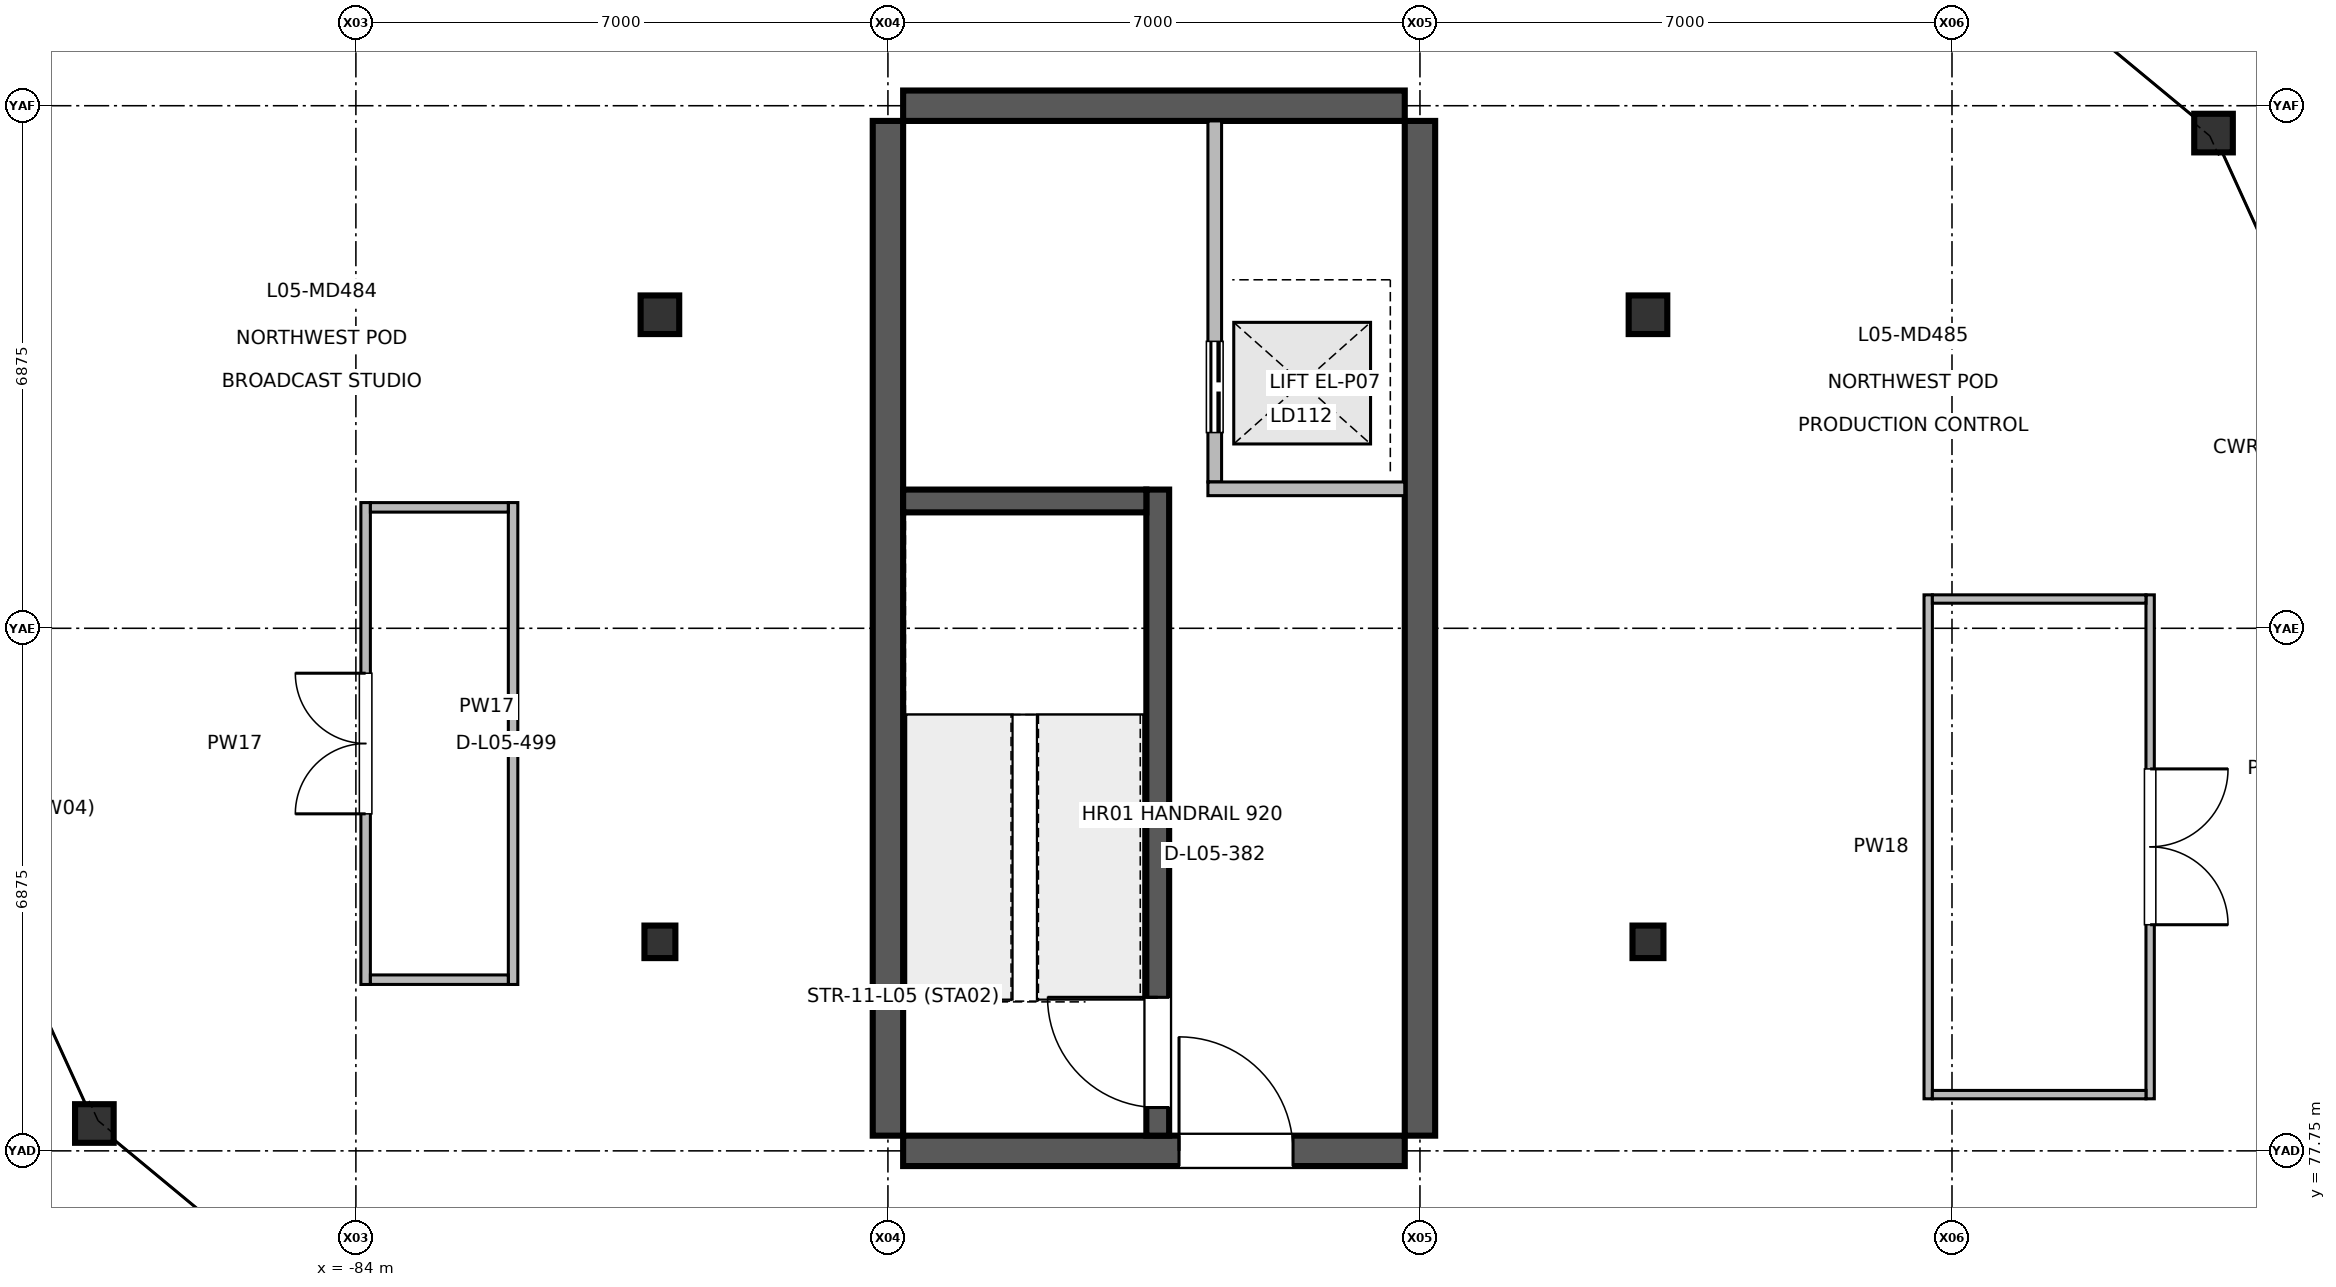
"""IFC4 building model, lengths in metres.
Left out: names, types, materials, properties, quantities, classifications, styles, units other than length and angle.
Written with IfcOpenShell. Run it as: python <this file> out.ifc"""

import sys

from ifc_helpers import new_model, si_unit, direction, frame, frame_2d, origin, origin_2d, place, context, subcontext, project, spatial, rectangle, hollow_circle, i_section, extrude, element, fill, save


model = new_model("IFC4")
c1 = context("Model", 3, precision=1e-05, world=origin(), true_north=direction((0.0, 1.0)))
c2 = subcontext(c1, "Body", "Model", "MODEL_VIEW")
j1 = project(units=[si_unit("LENGTHUNIT", "METRE"), si_unit("PLANEANGLEUNIT", "RADIAN")], contexts=[c1])
p1 = place(None, origin())
s1 = spatial("IfcSite", under=j1, at=p1, CompositionType="ELEMENT")
p2 = place(p1, origin())
s2 = spatial("IfcBuilding", under=s1, at=p2, CompositionType="ELEMENT")
p3 = place(p2, frame((0.0, 0.0, 21.0)))
s3 = spatial("IfcBuildingStorey", under=s2, at=p3, CompositionType="ELEMENT", Elevation=21.0)
for number, where, z_axis, x_axis in (
    (1, (-80.0, 80.5, 0.0), (0.0, 0.0, 1.0), (1.0, 0.0, 0.0)),
    (2, (-67.0, 80.5, 0.0), (0.0, 0.0, 1.0), (1.0, 0.0, 0.0)),
):
    element("IfcColumn", number, at=place(p3, frame(where, z_axis=z_axis, x_axis=x_axis)), inside=s3, PredefinedType="COLUMN", context=c2, shape_type="SweptSolid", body=[
        extrude(i_section(OverallWidth=0.407, OverallDepth=0.428, WebThickness=0.02, FlangeThickness=0.035, at=origin_2d()), origin(), (0.0, 0.0, 1.0), 5.398),
    ])
for number, where, z_axis, x_axis in (
    (3, (-80.0, 88.75, 0.0), (0.0, 0.0, 1.0), (1.0, 0.0, 0.0)),
    (4, (-67.0, 88.75, 0.0), (0.0, 0.0, 1.0), (1.0, 0.0, 0.0)),
    (5, (-59.559, 91.14, 0.0), (0.0, 0.0, 1.0), (1.0, 0.0, 0.0)),
    (6, (-87.441, 78.11, 0.0), (0.0, 0.0, 1.0), (1.0, 0.0, 0.0)),
):
    element("IfcColumn", number, at=place(p3, frame(where, z_axis=z_axis, x_axis=x_axis)), inside=s3, PredefinedType="COLUMN", context=c2, shape_type="SweptSolid", body=[
        extrude(hollow_circle(Radius=0.254, WallThickness=0.025, at=origin_2d()), origin(), (0.0, 0.0, 1.0), 5.398),
    ])
for number, where, z_axis, x_axis in (
    (7, (-77.0, 77.95, 0.0), (0.0, 0.0, 1.0), (0.0, 1.0, 0.0)),
    (8, (-70.0, 77.95, 0.0), (0.0, 0.0, 1.0), (0.0, 1.0, 0.0)),
):
    element("IfcWall", number, at=place(p3, frame(where, z_axis=z_axis, x_axis=x_axis)), inside=s3, PredefinedType="SHEAR", context=c2, shape_type="SweptSolid", body=[
        extrude(rectangle(XDim=13.35, YDim=0.4, at=frame_2d((6.675, 0.0))), origin(), (0.0, 0.0, 1.0), 5.15),
    ])
p4 = place(p3, frame((-76.8, 77.75, 0.0), z_axis=(0.0, 0.0, 1.0), x_axis=(1.0, 0.0, 0.0)))
e9 = element("IfcWall", 9, at=p4, inside=s3, PredefinedType="SHEAR", context=c2, shape_type="SweptSolid", body=[
    extrude(rectangle(XDim=6.6, YDim=0.4, at=frame_2d((3.3, 0.0))), origin(), (0.0, 0.0, 1.0), 5.15),
])
p5 = place(p4, frame((3.63, 0.0, 0.0)))
e10 = element("IfcOpeningElement", 10, at=p5, cuts=e9, PredefinedType="OPENING", context=c2, shape_type="SweptSolid", body=[
    extrude(rectangle(XDim=1.5, YDim=2.2, at=frame_2d((0.75, 1.1))), frame((0.0, 0.21, 0.0), z_axis=(0.0, -1.0, 0.0), x_axis=(1.0, 0.0, 0.0)), (0.0, 0.0, 1.0), 0.42),
])
p6 = place(p3, frame((-76.8, 91.5, 0.0), z_axis=(0.0, 0.0, 1.0), x_axis=(1.0, 0.0, 0.0)))
e11 = element("IfcWall", 11, at=p6, inside=s3, PredefinedType="SHEAR", context=c2, shape_type="SweptSolid", body=[
    extrude(rectangle(XDim=6.6, YDim=0.4, at=frame_2d((3.3, 0.0))), origin(), (0.0, 0.0, 1.0), 5.15),
])
p7 = place(p3, frame((-73.45, 77.95, 0.0), z_axis=(0.0, 0.0, 1.0), x_axis=(0.0, 1.0, 0.0)))
e12 = element("IfcWall", 12, at=p7, inside=s3, PredefinedType="SHEAR", context=c2, shape_type="SweptSolid", body=[
    extrude(rectangle(XDim=8.5, YDim=0.3, at=frame_2d((4.25, 0.0))), origin(), (0.0, 0.0, 1.0), 5.15),
])
p8 = place(p7, frame((0.37, 0.0, 0.0)))
e13 = element("IfcOpeningElement", 13, at=p8, cuts=e12, PredefinedType="OPENING", context=c2, shape_type="SweptSolid", body=[
    extrude(rectangle(XDim=1.45, YDim=2.2, at=frame_2d((0.725, 1.1))), frame((0.0, 0.16, 0.0), z_axis=(0.0, -1.0, 0.0), x_axis=(1.0, 0.0, 0.0)), (0.0, 0.0, 1.0), 0.32),
])
p9 = place(p3, frame((-72.7, 86.55, 0.0), z_axis=(0.0, 0.0, 1.0), x_axis=(0.0, 1.0, 0.0)))
e14 = element("IfcWall", 14, at=p9, inside=s3, PredefinedType="PARTITIONING", context=c2, shape_type="SweptSolid", body=[
    extrude(rectangle(XDim=4.75, YDim=0.18, at=frame_2d((2.375, 0.0))), origin(), (0.0, 0.0, 1.0), 4.42),
])
p10 = place(p9, frame((0.65, 0.0, 0.0)))
e15 = element("IfcOpeningElement", 15, at=p10, cuts=e14, PredefinedType="OPENING", context=c2, shape_type="SweptSolid", body=[
    extrude(rectangle(XDim=1.2, YDim=2.25, at=frame_2d((0.6, 1.125))), frame((0.0, 0.1, 0.0), z_axis=(0.0, -1.0, 0.0), x_axis=(1.0, 0.0, 0.0)), (0.0, 0.0, 1.0), 0.2),
])
p11 = place(p3, frame((-83.872, 79.939, 0.0), z_axis=(0.0, 0.0, 1.0), x_axis=(0.0, 1.0, 0.0)))
e16 = element("IfcWall", 16, at=p11, inside=s3, PredefinedType="PARTITIONING", context=c2, shape_type="SweptSolid", body=[
    extrude(rectangle(XDim=6.34, YDim=0.125, at=frame_2d((3.17, 0.0))), origin(), (0.0, 0.0, 1.0), 4.42),
])
p12 = place(p11, frame((2.245, 0.0, 0.0)))
e17 = element("IfcOpeningElement", 17, at=p12, cuts=e16, PredefinedType="OPENING", context=c2, shape_type="SweptSolid", body=[
    extrude(rectangle(XDim=1.85, YDim=2.4, at=frame_2d((0.925, 1.2))), frame((0.0, 0.073, 0.0), z_axis=(0.0, -1.0, 0.0), x_axis=(1.0, 0.0, 0.0)), (0.0, 0.0, 1.0), 0.145),
])
p13 = place(p3, frame((-60.393, 85.065, 0.0), z_axis=(0.0, 0.0, 1.0), x_axis=(0.0, -1.0, 0.0)))
e18 = element("IfcWall", 18, at=p13, inside=s3, PredefinedType="PARTITIONING", context=c2, shape_type="SweptSolid", body=[
    extrude(rectangle(XDim=6.63, YDim=0.11, at=frame_2d((3.315, 0.0))), origin(), (0.0, 0.0, 1.0), 4.42),
])
p14 = place(p13, frame((2.29, 0.0, 0.0)))
e19 = element("IfcOpeningElement", 19, at=p14, cuts=e18, PredefinedType="OPENING", context=c2, shape_type="SweptSolid", body=[
    extrude(rectangle(XDim=2.05, YDim=2.4, at=frame_2d((1.025, 1.2))), frame((0.0, 0.065, 0.0), z_axis=(0.0, -1.0, 0.0), x_axis=(1.0, 0.0, 0.0)), (0.0, 0.0, 1.0), 0.13),
])
p15 = place(p3, frame((-72.79, 86.46, 0.0), z_axis=(0.0, 0.0, 1.0), x_axis=(1.0, 0.0, 0.0)))
e20 = element("IfcWall", 20, at=p15, inside=s3, PredefinedType="PARTITIONING", context=c2, shape_type="SweptSolid", body=[
    extrude(rectangle(XDim=2.59, YDim=0.18, at=frame_2d((1.295, 0.0))), origin(), (0.0, 0.0, 1.0), 4.42),
])
p16 = place(p3, frame((-81.932, 79.939, 0.0), z_axis=(0.0, 0.0, 1.0), x_axis=(0.0, 1.0, 0.0)))
e21 = element("IfcWall", 21, at=p16, inside=s3, PredefinedType="PARTITIONING", context=c2, shape_type="SweptSolid", body=[
    extrude(rectangle(XDim=6.34, YDim=0.125, at=frame_2d((3.17, 0.0))), origin(), (0.0, 0.0, 1.0), 4.42),
])
for number, where, z_axis, x_axis in (
    (22, (-83.809, 80.002, 0.0), (0.0, 0.0, 1.0), (1.0, 0.0, 0.0)),
    (23, (-83.809, 86.216, 0.0), (0.0, 0.0, 1.0), (1.0, 0.0, 0.0)),
):
    element("IfcWall", number, at=place(p3, frame(where, z_axis=z_axis, x_axis=x_axis)), inside=s3, PredefinedType="PARTITIONING", context=c2, shape_type="SweptSolid", body=[
        extrude(rectangle(XDim=1.814, YDim=0.125, at=frame_2d((0.907, 0.0))), origin(), (0.0, 0.0, 1.0), 4.42),
    ])
p17 = place(p3, frame((-63.313, 78.435, 0.0), z_axis=(0.0, 0.0, 1.0), x_axis=(0.0, 1.0, 0.0)))
e24 = element("IfcWall", 24, at=p17, inside=s3, PredefinedType="PARTITIONING", context=c2, shape_type="SweptSolid", body=[
    extrude(rectangle(XDim=6.63, YDim=0.11, at=frame_2d((3.315, 0.0))), origin(), (0.0, 0.0, 1.0), 4.42),
])
for number, where, z_axis, x_axis in (
    (25, (-63.258, 78.49, 0.0), (0.0, 0.0, 1.0), (1.0, 0.0, 0.0)),
    (26, (-63.258, 85.01, 0.0), (0.0, 0.0, 1.0), (1.0, 0.0, 0.0)),
):
    element("IfcWall", number, at=place(p3, frame(where, z_axis=z_axis, x_axis=x_axis)), inside=s3, PredefinedType="PARTITIONING", context=c2, shape_type="SweptSolid", body=[
        extrude(rectangle(XDim=2.81, YDim=0.11, at=frame_2d((1.405, 0.0))), origin(), (0.0, 0.0, 1.0), 4.42),
    ])
p18 = place(p3, frame((-76.8, 86.3, 0.0), z_axis=(0.0, 0.0, 1.0), x_axis=(1.0, 0.0, 0.0)))
e27 = element("IfcWall", 27, at=p18, inside=s3, PredefinedType="SHEAR", context=c2, shape_type="SweptSolid", body=[
    extrude(rectangle(XDim=3.2, YDim=0.3, at=frame_2d((1.6, 0.0))), origin(), (0.0, 0.0, 1.0), 5.15),
])
p19 = place(p5, origin())
e28 = element("IfcDoor", 28, at=p19, inside=s3, OperationType="SINGLE_SWING_LEFT", PredefinedType="DOOR", context=c2, shape_type="SweptSolid", body=[
    extrude(rectangle(XDim=1.5, YDim=2.2, at=frame_2d((0.75, 1.1))), frame((0.0, 0.025, 0.0), z_axis=(0.0, -1.0, 0.0), x_axis=(1.0, 0.0, 0.0)), (0.0, 0.0, 1.0), 0.05),
])
fill(e10, e28)
p20 = place(p8, origin())
e29 = element("IfcDoor", 29, at=p20, inside=s3, OperationType="SINGLE_SWING_RIGHT", PredefinedType="DOOR", context=c2, shape_type="SweptSolid", body=[
    extrude(rectangle(XDim=1.45, YDim=2.2, at=frame_2d((0.725, 1.1))), frame((0.0, 0.025, 0.0), z_axis=(0.0, -1.0, 0.0), x_axis=(1.0, 0.0, 0.0)), (0.0, 0.0, 1.0), 0.05),
])
fill(e13, e29)
p21 = place(p10, origin())
e30 = element("IfcDoor", 30, at=p21, inside=s3, OperationType="DOUBLE_DOOR_SLIDING", PredefinedType="DOOR", context=c2, shape_type="SweptSolid", body=[
    extrude(rectangle(XDim=1.2, YDim=2.25, at=frame_2d((0.6, 1.125))), frame((0.0, 0.025, 0.0), z_axis=(0.0, -1.0, 0.0), x_axis=(1.0, 0.0, 0.0)), (0.0, 0.0, 1.0), 0.05),
])
fill(e15, e30)
p22 = place(p12, origin())
e31 = element("IfcDoor", 31, at=p22, inside=s3, OperationType="DOUBLE_DOOR_SINGLE_SWING", PredefinedType="DOOR", context=c2, shape_type="SweptSolid", body=[
    extrude(rectangle(XDim=1.85, YDim=2.4, at=frame_2d((0.925, 1.2))), frame((0.0, 0.025, 0.0), z_axis=(0.0, -1.0, 0.0), x_axis=(1.0, 0.0, 0.0)), (0.0, 0.0, 1.0), 0.05),
])
fill(e17, e31)
p23 = place(p14, origin())
e32 = element("IfcDoor", 32, at=p23, inside=s3, OperationType="DOUBLE_DOOR_SINGLE_SWING", PredefinedType="DOOR", context=c2, shape_type="SweptSolid", body=[
    extrude(rectangle(XDim=2.05, YDim=2.4, at=frame_2d((1.025, 1.2))), frame((0.0, 0.025, 0.0), z_axis=(0.0, -1.0, 0.0), x_axis=(1.0, 0.0, 0.0)), (0.0, 0.0, 1.0), 0.05),
])
fill(e19, e32)
save(model, sys.argv[1])
